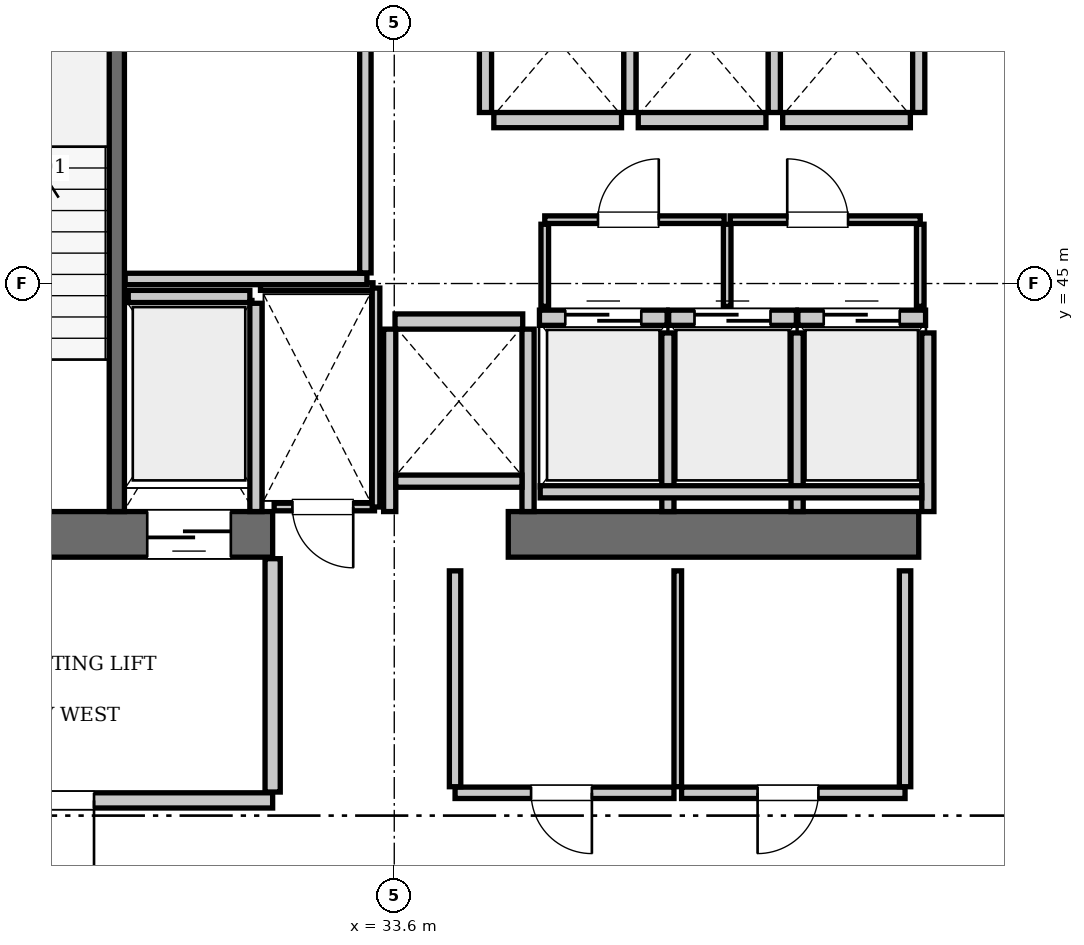
"""IFC4 building model, lengths in metres.
Left out: names, types, materials, properties, quantities, classifications, styles, units other than length and angle.
Written with IfcOpenShell. Run it as: python <this file> out.ifc"""

import sys

from ifc_helpers import new_model, si_unit, direction, frame, frame_2d, origin, place, context, subcontext, project, spatial, rectangle, extrude, element, fill, save


model = new_model("IFC4")
c1 = context("Model", 3, precision=1e-05, world=origin(), true_north=direction((0.0, 1.0)))
c2 = subcontext(c1, "Body", "Model", "MODEL_VIEW")
j1 = project(units=[si_unit("LENGTHUNIT", "METRE"), si_unit("PLANEANGLEUNIT", "RADIAN")], contexts=[c1])
p1 = place(None, origin())
s1 = spatial("IfcSite", under=j1, at=p1, CompositionType="ELEMENT")
p2 = place(p1, origin())
s2 = spatial("IfcBuilding", under=s1, at=p2, CompositionType="ELEMENT")
p3 = place(p2, frame((0.0, 0.0, 337.4)))
s3 = spatial("IfcBuildingStorey", under=s2, at=p3, CompositionType="ELEMENT", Elevation=337.4)
p4 = place(p3, frame((25.2, 41.7, 0.0), z_axis=(0.0, 0.0, 1.0), x_axis=(1.0, 0.0, 0.0)))
e1 = element("IfcWall", 1, at=p4, inside=s3, PredefinedType="SHEAR", context=c2, shape_type="SweptSolid", body=[
    extrude(rectangle(XDim=6.8, YDim=0.6, at=frame_2d((3.4, 0.0))), origin(), (0.0, 0.0, 1.0), 3.85),
])
p5 = place(p4, frame((1.65, 0.0, 0.0)))
e2 = element("IfcOpeningElement", 2, at=p5, cuts=e1, PredefinedType="OPENING", context=c2, shape_type="SweptSolid", body=[
    extrude(rectangle(XDim=1.15, YDim=2.15, at=frame_2d((0.575, 1.075))), frame((0.0, 0.31, 0.0), z_axis=(0.0, -1.0, 0.0), x_axis=(1.0, 0.0, 0.0)), (0.0, 0.0, 1.0), 0.62),
])
p6 = place(p4, frame((5.15, 0.0, 0.0)))
e3 = element("IfcOpeningElement", 3, at=p6, cuts=e1, PredefinedType="OPENING", context=c2, shape_type="SweptSolid", body=[
    extrude(rectangle(XDim=1.1, YDim=2.2, at=frame_2d((0.55, 1.1))), frame((0.0, 0.31, 0.0), z_axis=(0.0, -1.0, 0.0), x_axis=(1.0, 0.0, 0.0)), (0.0, 0.0, 1.0), 0.62),
])
p7 = place(p3, frame((35.1, 41.7, 0.0), z_axis=(0.0, 0.0, 1.0), x_axis=(1.0, 0.0, 0.0)))
e4 = element("IfcWall", 4, at=p7, inside=s3, PredefinedType="SHEAR", context=c2, shape_type="SweptSolid", body=[
    extrude(rectangle(XDim=5.4, YDim=0.6, at=frame_2d((2.7, 0.0))), origin(), (0.0, 0.0, 1.0), 3.85),
])
p8 = place(p3, frame((29.95, 42.0, 0.0), z_axis=(0.0, 0.0, 1.0), x_axis=(0.0, 1.0, 0.0)))
e5 = element("IfcWall", 5, at=p8, inside=s3, PredefinedType="SOLIDWALL", context=c2, shape_type="SweptSolid", body=[
    extrude(rectangle(XDim=9.15, YDim=0.2, at=frame_2d((4.575, 0.0))), origin(), (0.0, 0.0, 1.0), 3.61),
])
p9 = place(p3, frame((35.51, 44.55, 0.0), z_axis=(0.0, 0.0, 1.0), x_axis=(1.0, 0.0, 0.0)))
e6 = element("IfcWall", 6, at=p9, inside=s3, PredefinedType="SOLIDWALL", context=c2, shape_type="SweptSolid", body=[
    extrude(rectangle(XDim=1.68, YDim=0.2, at=frame_2d((0.84, 0.0))), origin(), (0.0, 0.0, 1.0), 3.61),
])
p10 = place(p9, frame((0.34, 0.0, 0.0)))
e7 = element("IfcOpeningElement", 7, at=p10, cuts=e6, PredefinedType="OPENING", context=c2, shape_type="SweptSolid", body=[
    extrude(rectangle(XDim=1.0, YDim=2.15, at=frame_2d((0.5, 1.075))), frame((0.0, 0.11, 0.0), z_axis=(0.0, -1.0, 0.0), x_axis=(1.0, 0.0, 0.0)), (0.0, 0.0, 1.0), 0.22),
])
p11 = place(p3, frame((37.21, 44.55, 0.0), z_axis=(0.0, 0.0, 1.0), x_axis=(1.0, 0.0, 0.0)))
e8 = element("IfcWall", 8, at=p11, inside=s3, PredefinedType="SOLIDWALL", context=c2, shape_type="SweptSolid", body=[
    extrude(rectangle(XDim=1.68, YDim=0.2, at=frame_2d((0.84, 0.0))), origin(), (0.0, 0.0, 1.0), 3.61),
])
p12 = place(p11, frame((0.34, 0.0, 0.0)))
e9 = element("IfcOpeningElement", 9, at=p12, cuts=e8, PredefinedType="OPENING", context=c2, shape_type="SweptSolid", body=[
    extrude(rectangle(XDim=1.0, YDim=2.15, at=frame_2d((0.5, 1.075))), frame((0.0, 0.11, 0.0), z_axis=(0.0, -1.0, 0.0), x_axis=(1.0, 0.0, 0.0)), (0.0, 0.0, 1.0), 0.22),
])
p13 = place(p3, frame((38.91, 44.55, 0.0), z_axis=(0.0, 0.0, 1.0), x_axis=(1.0, 0.0, 0.0)))
e10 = element("IfcWall", 10, at=p13, inside=s3, PredefinedType="SOLIDWALL", context=c2, shape_type="SweptSolid", body=[
    extrude(rectangle(XDim=1.68, YDim=0.2, at=frame_2d((0.84, 0.0))), origin(), (0.0, 0.0, 1.0), 3.61),
])
p14 = place(p13, frame((0.34, 0.0, 0.0)))
e11 = element("IfcOpeningElement", 11, at=p14, cuts=e10, PredefinedType="OPENING", context=c2, shape_type="SweptSolid", body=[
    extrude(rectangle(XDim=1.0, YDim=2.15, at=frame_2d((0.5, 1.075))), frame((0.0, 0.11, 0.0), z_axis=(0.0, -1.0, 0.0), x_axis=(1.0, 0.0, 0.0)), (0.0, 0.0, 1.0), 0.22),
])
p15 = place(p3, frame((34.91, 47.15, 0.0), z_axis=(0.0, 0.0, 1.0), x_axis=(1.0, 0.0, 0.0)))
e12 = element("IfcWall", 12, at=p15, inside=s3, PredefinedType="SOLIDWALL", context=c2, shape_type="SweptSolid", body=[
    extrude(rectangle(XDim=1.68, YDim=0.2, at=frame_2d((0.84, 0.0))), origin(), (0.0, 0.0, 1.0), 3.61),
])
for number, where, z_axis, x_axis in (
    (13, (36.81, 47.15, 0.0), (0.0, 0.0, 1.0), (1.0, 0.0, 0.0)),
    (14, (38.71, 47.15, 0.0), (0.0, 0.0, 1.0), (1.0, 0.0, 0.0)),
    (15, (33.61, 44.5, 0.0), (0.0, 0.0, 1.0), (1.0, 0.0, 0.0)),
):
    element("IfcWall", number, at=place(p3, frame(where, z_axis=z_axis, x_axis=x_axis)), inside=s3, PredefinedType="SOLIDWALL", context=c2, shape_type="SweptSolid", body=[
        extrude(rectangle(XDim=1.68, YDim=0.2, at=frame_2d((0.84, 0.0))), origin(), (0.0, 0.0, 1.0), 3.61),
    ])
p16 = place(p3, frame((30.1, 44.83, 0.0), z_axis=(0.0, 0.0, 1.0), x_axis=(1.0, 0.0, 0.0)))
e16 = element("IfcWall", 16, at=p16, inside=s3, PredefinedType="SOLIDWALL", context=c2, shape_type="SweptSolid", body=[
    extrude(rectangle(XDim=1.6, YDim=0.16, at=frame_2d((0.8, 0.0))), origin(), (0.0, 0.0, 1.0), 3.61),
])
p17 = place(p3, frame((31.78, 42.0, 0.0), z_axis=(0.0, 0.0, 1.0), x_axis=(0.0, 1.0, 0.0)))
e17 = element("IfcWall", 17, at=p17, inside=s3, PredefinedType="SOLIDWALL", context=c2, shape_type="SweptSolid", body=[
    extrude(rectangle(XDim=2.74, YDim=0.16, at=frame_2d((1.37, 0.0))), origin(), (0.0, 0.0, 1.0), 3.61),
])
for number, where, z_axis, x_axis in (
    (18, (37.2, 42.0, 0.0), (0.0, 0.0, 1.0), (0.0, 1.0, 0.0)),
    (19, (38.9, 42.0, 0.0), (0.0, 0.0, 1.0), (0.0, 1.0, 0.0)),
    (20, (40.62, 42.0, 0.0), (0.0, 0.0, 1.0), (0.0, 1.0, 0.0)),
):
    element("IfcWall", number, at=place(p3, frame(where, z_axis=z_axis, x_axis=x_axis)), inside=s3, PredefinedType="SOLIDWALL", context=c2, shape_type="SweptSolid", body=[
        extrude(rectangle(XDim=2.35, YDim=0.16, at=frame_2d((1.175, 0.0))), origin(), (0.0, 0.0, 1.0), 3.61),
    ])
p18 = place(p3, frame((35.52, 42.26, 0.0), z_axis=(0.0, 0.0, 1.0), x_axis=(1.0, 0.0, 0.0)))
e21 = element("IfcWall", 21, at=p18, inside=s3, PredefinedType="SOLIDWALL", context=c2, shape_type="SweptSolid", body=[
    extrude(rectangle(XDim=5.02, YDim=0.16, at=frame_2d((2.51, 0.0))), origin(), (0.0, 0.0, 1.0), 3.61),
])
for number, where, z_axis, x_axis in (
    (22, (34.8, 47.25, 0.0), (0.0, 0.0, 1.0), (0.0, 1.0, 0.0)),
    (23, (36.7, 47.25, 0.0), (0.0, 0.0, 1.0), (0.0, 1.0, 0.0)),
    (24, (38.6, 47.25, 0.0), (0.0, 0.0, 1.0), (0.0, 1.0, 0.0)),
    (25, (40.5, 47.25, 0.0), (0.0, 0.0, 1.0), (0.0, 1.0, 0.0)),
):
    element("IfcWall", number, at=place(p3, frame(where, z_axis=z_axis, x_axis=x_axis)), inside=s3, PredefinedType="SOLIDWALL", context=c2, shape_type="SweptSolid", body=[
        extrude(rectangle(XDim=2.19, YDim=0.16, at=frame_2d((1.095, 0.0))), origin(), (0.0, 0.0, 1.0), 3.61),
    ])
for number, where, z_axis, x_axis in (
    (26, (33.54, 42.0, 0.0), (0.0, 0.0, 1.0), (0.0, 1.0, 0.0)),
    (27, (35.36, 42.0, 0.0), (0.0, 0.0, 1.0), (0.0, 1.0, 0.0)),
):
    element("IfcWall", number, at=place(p3, frame(where, z_axis=z_axis, x_axis=x_axis)), inside=s3, PredefinedType="SOLIDWALL", context=c2, shape_type="SweptSolid", body=[
        extrude(rectangle(XDim=2.4, YDim=0.16, at=frame_2d((1.2, 0.0))), origin(), (0.0, 0.0, 1.0), 3.61),
    ])
p19 = place(p3, frame((33.62, 42.4, 0.0), z_axis=(0.0, 0.0, 1.0), x_axis=(1.0, 0.0, 0.0)))
e28 = element("IfcWall", 28, at=p19, inside=s3, PredefinedType="SOLIDWALL", context=c2, shape_type="SweptSolid", body=[
    extrude(rectangle(XDim=1.66, YDim=0.16, at=frame_2d((0.83, 0.0))), origin(), (0.0, 0.0, 1.0), 3.61),
])
p20 = place(p3, frame((26.2, 38.2, 0.0), z_axis=(0.0, 0.0, 1.0), x_axis=(1.0, 0.0, 0.0)))
e29 = element("IfcWall", 29, at=p20, inside=s3, PredefinedType="PARTITIONING", context=c2, shape_type="SweptSolid", body=[
    extrude(rectangle(XDim=5.8, YDim=0.2, at=frame_2d((2.9, 0.0))), origin(), (0.0, 0.0, 1.0), 3.61),
])
p21 = place(p20, frame((2.3, 0.0, 0.0)))
e30 = element("IfcOpeningElement", 30, at=p21, cuts=e29, PredefinedType="OPENING", context=c2, shape_type="SweptSolid", body=[
    extrude(rectangle(XDim=1.15, YDim=2.15, at=frame_2d((0.575, 1.075))), frame((0.0, 0.11, 0.0), z_axis=(0.0, -1.0, 0.0), x_axis=(1.0, 0.0, 0.0)), (0.0, 0.0, 1.0), 0.22),
])
p22 = place(p3, frame((32.0, 38.31, 0.0), z_axis=(0.0, 0.0, 1.0), x_axis=(0.0, 1.0, 0.0)))
e31 = element("IfcWall", 31, at=p22, inside=s3, PredefinedType="PARTITIONING", context=c2, shape_type="SweptSolid", body=[
    extrude(rectangle(XDim=3.07, YDim=0.2, at=frame_2d((1.535, 0.0))), origin(), (0.0, 0.0, 1.0), 3.61),
])
p23 = place(p3, frame((32.02, 42.06, 0.0), z_axis=(0.0, 0.0, 1.0), x_axis=(1.0, 0.0, 0.0)))
e32 = element("IfcWall", 32, at=p23, inside=s3, PredefinedType="PARTITIONING", context=c2, shape_type="SweptSolid", body=[
    extrude(rectangle(XDim=1.32, YDim=0.1, at=frame_2d((0.66, 0.0))), origin(), (0.0, 0.0, 1.0), 3.61),
])
p24 = place(p23, frame((0.24, 0.0, 0.0)))
e33 = element("IfcOpeningElement", 33, at=p24, cuts=e32, PredefinedType="OPENING", context=c2, shape_type="SweptSolid", body=[
    extrude(rectangle(XDim=0.8, YDim=2.05, at=frame_2d((0.4, 1.025))), frame((0.0, 0.06, 0.0), z_axis=(0.0, -1.0, 0.0), x_axis=(1.0, 0.0, 0.0)), (0.0, 0.0, 1.0), 0.12),
])
p25 = place(p3, frame((31.84, 44.96, 0.0), z_axis=(0.0, 0.0, 1.0), x_axis=(1.0, 0.0, 0.0)))
e34 = element("IfcWall", 34, at=p25, inside=s3, PredefinedType="PARTITIONING", context=c2, shape_type="SweptSolid", body=[
    extrude(rectangle(XDim=1.48, YDim=0.1, at=frame_2d((0.74, 0.0))), origin(), (0.0, 0.0, 1.0), 3.61),
])
p26 = place(p3, frame((33.36, 42.06, 0.0), z_axis=(0.0, 0.0, 1.0), x_axis=(0.0, 1.0, 0.0)))
e35 = element("IfcWall", 35, at=p26, inside=s3, PredefinedType="PARTITIONING", context=c2, shape_type="SweptSolid", body=[
    extrude(rectangle(XDim=2.88, YDim=0.1, at=frame_2d((1.44, 0.0))), origin(), (0.0, 0.0, 1.0), 3.61),
])
p27 = place(p3, frame((35.58, 45.84, 0.0), z_axis=(0.0, 0.0, 1.0), x_axis=(1.0, 0.0, 0.0)))
e36 = element("IfcWall", 36, at=p27, inside=s3, PredefinedType="PARTITIONING", context=c2, shape_type="SweptSolid", body=[
    extrude(rectangle(XDim=2.36, YDim=0.1, at=frame_2d((1.18, 0.0))), origin(), (0.0, 0.0, 1.0), 3.61),
])
p28 = place(p27, frame((0.7, 0.0, 0.0)))
e37 = element("IfcOpeningElement", 37, at=p28, cuts=e36, PredefinedType="OPENING", context=c2, shape_type="SweptSolid", body=[
    extrude(rectangle(XDim=0.8, YDim=2.05, at=frame_2d((0.4, 1.025))), frame((0.0, 0.06, 0.0), z_axis=(0.0, -1.0, 0.0), x_axis=(1.0, 0.0, 0.0)), (0.0, 0.0, 1.0), 0.12),
])
p29 = place(p3, frame((38.02, 45.84, 0.0), z_axis=(0.0, 0.0, 1.0), x_axis=(1.0, 0.0, 0.0)))
e38 = element("IfcWall", 38, at=p29, inside=s3, PredefinedType="PARTITIONING", context=c2, shape_type="SweptSolid", body=[
    extrude(rectangle(XDim=2.5, YDim=0.1, at=frame_2d((1.25, 0.0))), origin(), (0.0, 0.0, 1.0), 3.61),
])
p30 = place(p29, frame((0.75, 0.0, 0.0)))
e39 = element("IfcOpeningElement", 39, at=p30, cuts=e38, PredefinedType="OPENING", context=c2, shape_type="SweptSolid", body=[
    extrude(rectangle(XDim=0.8, YDim=2.05, at=frame_2d((0.4, 1.025))), frame((0.0, 0.06, 0.0), z_axis=(0.0, -1.0, 0.0), x_axis=(1.0, 0.0, 0.0)), (0.0, 0.0, 1.0), 0.12),
])
for number, where, z_axis, x_axis in (
    (40, (35.58, 44.7, 0.0), (0.0, 0.0, 1.0), (0.0, 1.0, 0.0)),
    (41, (37.98, 44.7, 0.0), (0.0, 0.0, 1.0), (0.0, 1.0, 0.0)),
    (42, (40.52, 44.7, 0.0), (0.0, 0.0, 1.0), (0.0, 1.0, 0.0)),
):
    element("IfcWall", number, at=place(p3, frame(where, z_axis=z_axis, x_axis=x_axis)), inside=s3, PredefinedType="PARTITIONING", context=c2, shape_type="SweptSolid", body=[
        extrude(rectangle(XDim=1.08, YDim=0.1, at=frame_2d((0.54, 0.0))), origin(), (0.0, 0.0, 1.0), 3.61),
    ])
p31 = place(p3, frame((30.06, 45.06, 0.0), z_axis=(0.0, 0.0, 1.0), x_axis=(1.0, 0.0, 0.0)))
e43 = element("IfcWall", 43, at=p31, inside=s3, PredefinedType="PARTITIONING", context=c2, shape_type="SweptSolid", body=[
    extrude(rectangle(XDim=3.18, YDim=0.15, at=frame_2d((1.59, 0.0))), origin(), (0.0, 0.0, 1.0), 3.61),
])
p32 = place(p3, frame((33.22, 45.14, 0.0), z_axis=(0.0, 0.0, 1.0), x_axis=(0.0, 1.0, 0.0)))
e44 = element("IfcWall", 44, at=p32, inside=s3, PredefinedType="PARTITIONING", context=c2, shape_type="SweptSolid", body=[
    extrude(rectangle(XDim=4.16, YDim=0.15, at=frame_2d((2.08, 0.0))), origin(), (0.0, 0.0, 1.0), 3.61),
])
p33 = place(p3, frame((34.4, 38.3, 0.0), z_axis=(0.0, 0.0, 1.0), x_axis=(1.0, 0.0, 0.0)))
e45 = element("IfcWall", 45, at=p33, inside=s3, PredefinedType="PARTITIONING", context=c2, shape_type="SweptSolid", body=[
    extrude(rectangle(XDim=2.88, YDim=0.15, at=frame_2d((1.44, 0.0))), origin(), (0.0, 0.0, 1.0), 3.61),
])
p34 = place(p33, frame((1.0, 0.0, 0.0)))
e46 = element("IfcOpeningElement", 46, at=p34, cuts=e45, PredefinedType="OPENING", context=c2, shape_type="SweptSolid", body=[
    extrude(rectangle(XDim=0.8, YDim=2.05, at=frame_2d((0.4, 1.025))), frame((0.0, 0.085, 0.0), z_axis=(0.0, -1.0, 0.0), x_axis=(1.0, 0.0, 0.0)), (0.0, 0.0, 1.0), 0.17),
])
p35 = place(p3, frame((37.38, 38.3, 0.0), z_axis=(0.0, 0.0, 1.0), x_axis=(1.0, 0.0, 0.0)))
e47 = element("IfcWall", 47, at=p35, inside=s3, PredefinedType="PARTITIONING", context=c2, shape_type="SweptSolid", body=[
    extrude(rectangle(XDim=2.94, YDim=0.15, at=frame_2d((1.47, 0.0))), origin(), (0.0, 0.0, 1.0), 3.61),
])
p36 = place(p35, frame((1.0, 0.0, 0.0)))
e48 = element("IfcOpeningElement", 48, at=p36, cuts=e47, PredefinedType="OPENING", context=c2, shape_type="SweptSolid", body=[
    extrude(rectangle(XDim=0.8, YDim=2.05, at=frame_2d((0.4, 1.025))), frame((0.0, 0.085, 0.0), z_axis=(0.0, -1.0, 0.0), x_axis=(1.0, 0.0, 0.0)), (0.0, 0.0, 1.0), 0.17),
])
p37 = place(p3, frame((34.4, 38.38, 0.0), z_axis=(0.0, 0.0, 1.0), x_axis=(0.0, 1.0, 0.0)))
e49 = element("IfcWall", 49, at=p37, inside=s3, PredefinedType="PARTITIONING", context=c2, shape_type="SweptSolid", body=[
    extrude(rectangle(XDim=2.84, YDim=0.15, at=frame_2d((1.42, 0.0))), origin(), (0.0, 0.0, 1.0), 3.61),
])
p38 = place(p3, frame((37.33, 38.38, 0.0), z_axis=(0.0, 0.0, 1.0), x_axis=(0.0, 1.0, 0.0)))
e50 = element("IfcWall", 50, at=p38, inside=s3, PredefinedType="PARTITIONING", context=c2, shape_type="SweptSolid", body=[
    extrude(rectangle(XDim=2.84, YDim=0.1, at=frame_2d((1.42, 0.0))), origin(), (0.0, 0.0, 1.0), 3.61),
])
p39 = place(p3, frame((40.32, 38.38, 0.0), z_axis=(0.0, 0.0, 1.0), x_axis=(0.0, 1.0, 0.0)))
e51 = element("IfcWall", 51, at=p39, inside=s3, PredefinedType="PARTITIONING", context=c2, shape_type="SweptSolid", body=[
    extrude(rectangle(XDim=2.84, YDim=0.15, at=frame_2d((1.42, 0.0))), origin(), (0.0, 0.0, 1.0), 3.61),
])
p40 = place(p10, origin())
e52 = element("IfcDoor", 52, at=p40, inside=s3, OperationType="SLIDING_TO_LEFT", PredefinedType="DOOR", context=c2, shape_type="SweptSolid", body=[
    extrude(rectangle(XDim=1.0, YDim=2.15, at=frame_2d((0.5, 1.075))), frame((0.0, 0.025, 0.0), z_axis=(0.0, -1.0, 0.0), x_axis=(1.0, 0.0, 0.0)), (0.0, 0.0, 1.0), 0.05),
])
fill(e7, e52)
p41 = place(p12, origin())
e53 = element("IfcDoor", 53, at=p41, inside=s3, OperationType="SLIDING_TO_LEFT", PredefinedType="DOOR", context=c2, shape_type="SweptSolid", body=[
    extrude(rectangle(XDim=1.0, YDim=2.15, at=frame_2d((0.5, 1.075))), frame((0.0, 0.025, 0.0), z_axis=(0.0, -1.0, 0.0), x_axis=(1.0, 0.0, 0.0)), (0.0, 0.0, 1.0), 0.05),
])
fill(e9, e53)
p42 = place(p14, origin())
e54 = element("IfcDoor", 54, at=p42, inside=s3, OperationType="SLIDING_TO_LEFT", PredefinedType="DOOR", context=c2, shape_type="SweptSolid", body=[
    extrude(rectangle(XDim=1.0, YDim=2.15, at=frame_2d((0.5, 1.075))), frame((0.0, 0.025, 0.0), z_axis=(0.0, -1.0, 0.0), x_axis=(1.0, 0.0, 0.0)), (0.0, 0.0, 1.0), 0.05),
])
fill(e11, e54)
p43 = place(p6, frame((1.1, 0.0, 0.0), z_axis=(0.0, 0.0, 1.0), x_axis=(-1.0, 0.0, 0.0)))
e55 = element("IfcDoor", 55, at=p43, inside=s3, OperationType="SLIDING_TO_LEFT", PredefinedType="DOOR", context=c2, shape_type="SweptSolid", body=[
    extrude(rectangle(XDim=1.1, YDim=2.2, at=frame_2d((0.55, 1.1))), frame((0.0, 0.025, 0.0), z_axis=(0.0, -1.0, 0.0), x_axis=(1.0, 0.0, 0.0)), (0.0, 0.0, 1.0), 0.05),
])
fill(e3, e55)
p44 = place(p21, frame((1.15, 0.0, 0.0), z_axis=(0.0, 0.0, 1.0), x_axis=(-1.0, 0.0, 0.0)))
e56 = element("IfcDoor", 56, at=p44, inside=s3, OperationType="SINGLE_SWING_LEFT", PredefinedType="DOOR", context=c2, shape_type="SweptSolid", body=[
    extrude(rectangle(XDim=1.15, YDim=2.15, at=frame_2d((0.575, 1.075))), frame((0.0, 0.025, 0.0), z_axis=(0.0, -1.0, 0.0), x_axis=(1.0, 0.0, 0.0)), (0.0, 0.0, 1.0), 0.05),
])
fill(e30, e56)
p45 = place(p24, frame((0.8, 0.0, 0.0), z_axis=(0.0, 0.0, 1.0), x_axis=(-1.0, 0.0, 0.0)))
e57 = element("IfcDoor", 57, at=p45, inside=s3, OperationType="SINGLE_SWING_LEFT", PredefinedType="DOOR", context=c2, shape_type="SweptSolid", body=[
    extrude(rectangle(XDim=0.8, YDim=2.05, at=frame_2d((0.4, 1.025))), frame((0.0, 0.025, 0.0), z_axis=(0.0, -1.0, 0.0), x_axis=(1.0, 0.0, 0.0)), (0.0, 0.0, 1.0), 0.05),
])
fill(e33, e57)
p46 = place(p28, origin())
e58 = element("IfcDoor", 58, at=p46, inside=s3, OperationType="SINGLE_SWING_RIGHT", PredefinedType="DOOR", context=c2, shape_type="SweptSolid", body=[
    extrude(rectangle(XDim=0.8, YDim=2.05, at=frame_2d((0.4, 1.025))), frame((0.0, 0.025, 0.0), z_axis=(0.0, -1.0, 0.0), x_axis=(1.0, 0.0, 0.0)), (0.0, 0.0, 1.0), 0.05),
])
fill(e37, e58)
p47 = place(p30, origin())
e59 = element("IfcDoor", 59, at=p47, inside=s3, OperationType="SINGLE_SWING_LEFT", PredefinedType="DOOR", context=c2, shape_type="SweptSolid", body=[
    extrude(rectangle(XDim=0.8, YDim=2.05, at=frame_2d((0.4, 1.025))), frame((0.0, 0.025, 0.0), z_axis=(0.0, -1.0, 0.0), x_axis=(1.0, 0.0, 0.0)), (0.0, 0.0, 1.0), 0.05),
])
fill(e39, e59)
p48 = place(p34, frame((0.8, 0.0, 0.0), z_axis=(0.0, 0.0, 1.0), x_axis=(-1.0, 0.0, 0.0)))
e60 = element("IfcDoor", 60, at=p48, inside=s3, OperationType="SINGLE_SWING_LEFT", PredefinedType="DOOR", context=c2, shape_type="SweptSolid", body=[
    extrude(rectangle(XDim=0.8, YDim=2.05, at=frame_2d((0.4, 1.025))), frame((0.0, 0.025, 0.0), z_axis=(0.0, -1.0, 0.0), x_axis=(1.0, 0.0, 0.0)), (0.0, 0.0, 1.0), 0.05),
])
fill(e46, e60)
p49 = place(p36, frame((0.8, 0.0, 0.0), z_axis=(0.0, 0.0, 1.0), x_axis=(-1.0, 0.0, 0.0)))
e61 = element("IfcDoor", 61, at=p49, inside=s3, OperationType="SINGLE_SWING_RIGHT", PredefinedType="DOOR", context=c2, shape_type="SweptSolid", body=[
    extrude(rectangle(XDim=0.8, YDim=2.05, at=frame_2d((0.4, 1.025))), frame((0.0, 0.025, 0.0), z_axis=(0.0, -1.0, 0.0), x_axis=(1.0, 0.0, 0.0)), (0.0, 0.0, 1.0), 0.05),
])
fill(e48, e61)
save(model, sys.argv[1])
